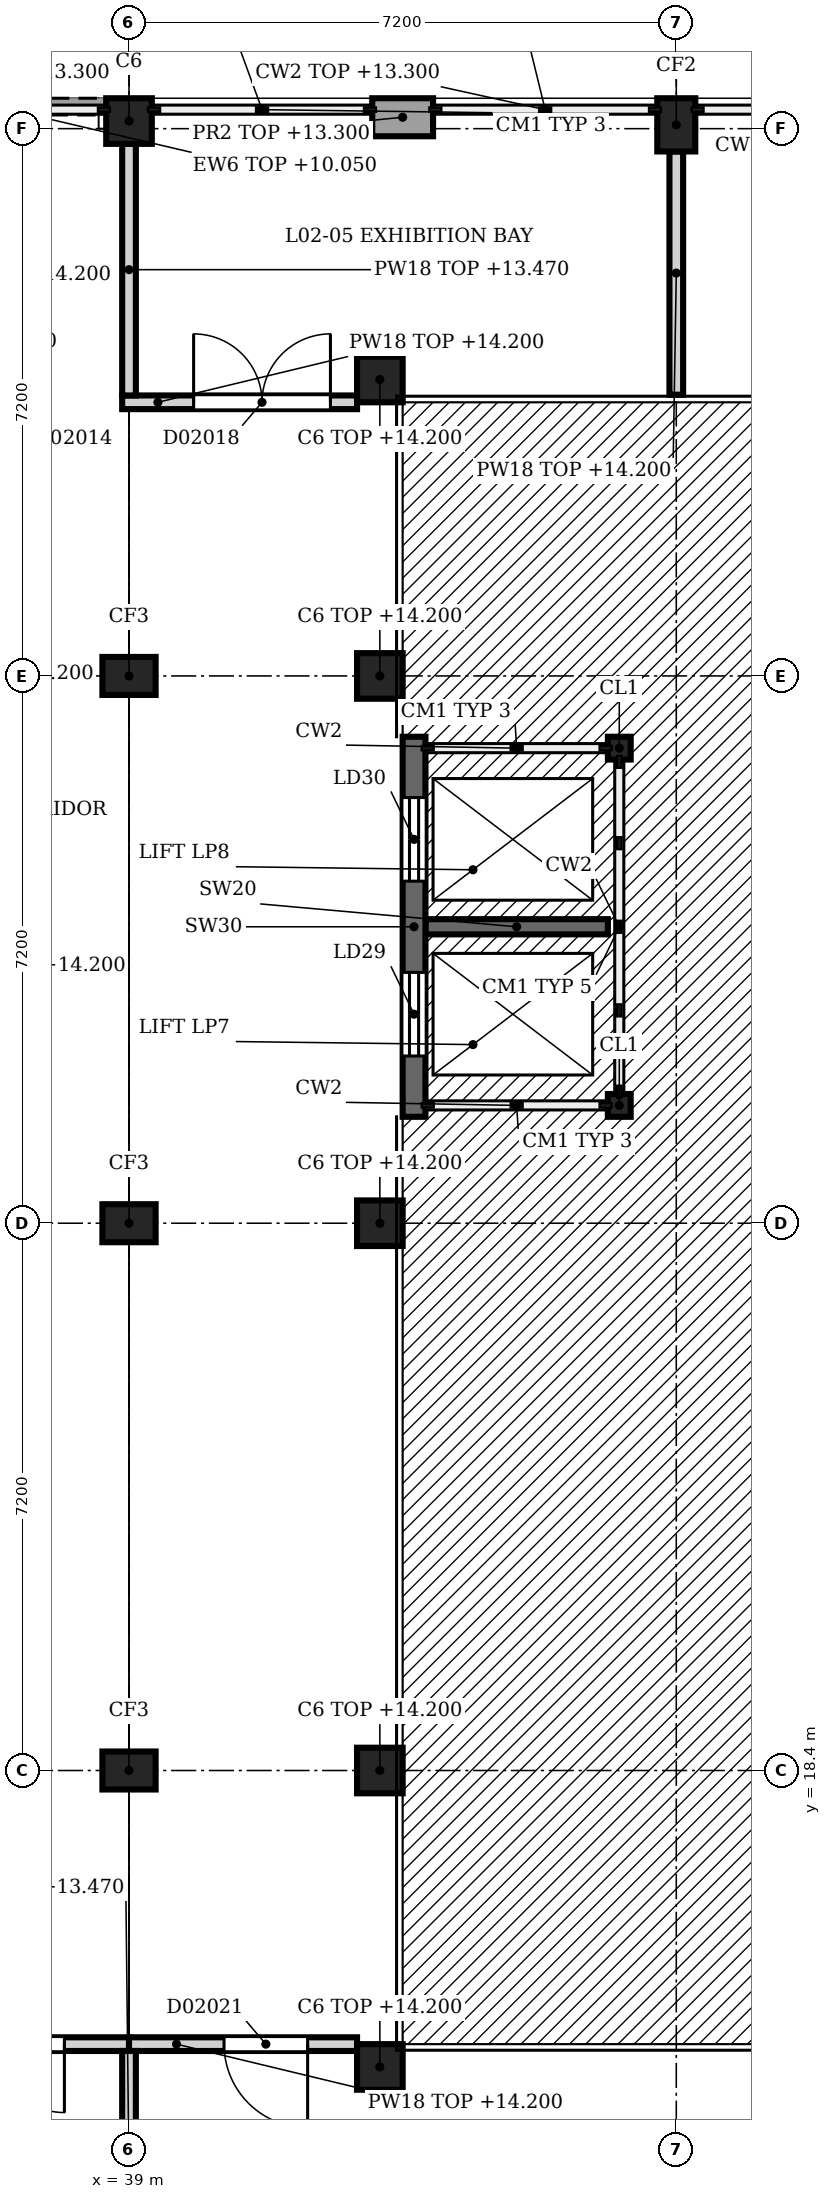
"""IFC4 building model, lengths in metres.
Left out: names, types, materials, properties, quantities, classifications, styles, units other than length and angle.
Written with IfcOpenShell. Run it as: python <this file> out.ifc"""

import sys

from ifc_helpers import new_model, si_unit, direction, frame, frame_2d, origin, origin_2d, place, context, subcontext, project, spatial, rectangle, extrude, element, fill, save


model = new_model("IFC4")
c1 = context("Model", 3, precision=1e-05, world=origin(), true_north=direction((0.0, 1.0)))
c2 = subcontext(c1, "Body", "Model", "MODEL_VIEW")
j1 = project(units=[si_unit("LENGTHUNIT", "METRE"), si_unit("PLANEANGLEUNIT", "RADIAN")], contexts=[c1])
p1 = place(None, origin())
s1 = spatial("IfcSite", under=j1, at=p1, CompositionType="ELEMENT")
p2 = place(p1, origin())
s2 = spatial("IfcBuilding", under=s1, at=p2, CompositionType="ELEMENT")
p3 = place(p2, frame((0.0, 0.0, 9.9)))
s3 = spatial("IfcBuildingStorey", under=s2, at=p3, CompositionType="ELEMENT", Elevation=9.9)
for number, where, z_axis, x_axis in (
    (1, (39.0, 18.4, 0.0), (0.0, 0.0, 1.0), (1.0, 0.0, 0.0)),
    (2, (39.0, 25.6, 0.0), (0.0, 0.0, 1.0), (1.0, 0.0, 0.0)),
    (3, (39.0, 32.8, 0.0), (0.0, 0.0, 1.0), (1.0, 0.0, 0.0)),
):
    element("IfcColumn", number, at=place(p3, frame(where, z_axis=z_axis, x_axis=x_axis)), inside=s3, PredefinedType="COLUMN", context=c2, shape_type="SweptSolid", body=[
        extrude(rectangle(XDim=0.7, YDim=0.5, at=origin_2d()), origin(), (0.0, 0.0, 1.0), 4.5),
    ])
p4 = place(p3, frame((39.0, 40.1, 0.0), z_axis=(0.0, 0.0, 1.0), x_axis=(1.0, 0.0, 0.0)))
e4 = element("IfcColumn", 4, at=p4, inside=s3, PredefinedType="COLUMN", context=c2, shape_type="SweptSolid", body=[
    extrude(rectangle(XDim=0.6, YDim=0.6, at=origin_2d()), origin(), (0.0, 0.0, 1.0), 4.5),
])
p5 = place(p3, frame((46.2, 40.05, 0.0), z_axis=(0.0, 0.0, 1.0), x_axis=(1.0, 0.0, 0.0)))
e5 = element("IfcColumn", 5, at=p5, inside=s3, PredefinedType="COLUMN", context=c2, shape_type="SweptSolid", body=[
    extrude(rectangle(XDim=0.5, YDim=0.7, at=origin_2d()), origin(), (0.0, 0.0, 1.0), 4.5),
])
for number, where, z_axis, x_axis in (
    (6, (42.3, 14.5, 0.0), (0.0, 0.0, 1.0), (1.0, 0.0, 0.0)),
    (7, (42.3, 18.4, 0.0), (0.0, 0.0, 1.0), (1.0, 0.0, 0.0)),
    (8, (42.3, 25.6, 0.0), (0.0, 0.0, 1.0), (1.0, 0.0, 0.0)),
    (9, (42.3, 32.8, 0.0), (0.0, 0.0, 1.0), (1.0, 0.0, 0.0)),
    (10, (42.3, 36.7, 0.0), (0.0, 0.0, 1.0), (1.0, 0.0, 0.0)),
):
    element("IfcColumn", number, at=place(p3, frame(where, z_axis=z_axis, x_axis=x_axis)), inside=s3, PredefinedType="COLUMN", context=c2, shape_type="SweptSolid", body=[
        extrude(rectangle(XDim=0.6, YDim=0.6, at=origin_2d()), origin(), (0.0, 0.0, 1.0), 4.3),
    ])
p6 = place(p3, frame((35.8, 40.29, 0.0), z_axis=(0.0, 0.0, 1.0), x_axis=(1.0, 0.0, 0.0)))
e11 = element("IfcWall", 11, at=p6, inside=s3, PredefinedType="SOLIDWALL", context=c2, shape_type="SweptSolid", body=[
    extrude(rectangle(XDim=2.9, YDim=0.22, at=frame_2d((1.45, 0.0))), origin(), (0.0, 0.0, 1.0), 0.15),
])
p7 = place(p3, frame((42.2, 40.15, 0.0), z_axis=(0.0, 0.0, 1.0), x_axis=(1.0, 0.0, 0.0)))
e12 = element("IfcWall", 12, at=p7, inside=s3, PredefinedType="SOLIDWALL", context=c2, shape_type="SweptSolid", body=[
    extrude(rectangle(XDim=0.8, YDim=0.5, at=frame_2d((0.4, 0.0))), origin(), (0.0, 0.0, 1.0), 3.4),
])
p8 = place(p3, frame((35.4, 14.8, 0.0), z_axis=(0.0, 0.0, 1.0), x_axis=(1.0, 0.0, 0.0)))
e13 = element("IfcWall", 13, at=p8, inside=s3, PredefinedType="PARTITIONING", context=c2, shape_type="SweptSolid", body=[
    extrude(rectangle(XDim=3.6, YDim=0.18, at=frame_2d((1.8, 0.0))), origin(), (0.0, 0.0, 1.0), 4.3),
])
p9 = place(p8, frame((0.95, 0.0, 0.0)))
e14 = element("IfcOpeningElement", 14, at=p9, cuts=e13, PredefinedType="OPENING", context=c2, shape_type="SweptSolid", body=[
    extrude(rectangle(XDim=1.8, YDim=2.1, at=frame_2d((0.9, 1.05))), frame((0.0, 0.1, 0.0), z_axis=(0.0, -1.0, 0.0), x_axis=(1.0, 0.0, 0.0)), (0.0, 0.0, 1.0), 0.2),
])
p10 = place(p3, frame((42.0, 14.8, 0.0), z_axis=(0.0, 0.0, 1.0), x_axis=(-1.0, 0.0, 0.0)))
e15 = element("IfcWall", 15, at=p10, inside=s3, PredefinedType="PARTITIONING", context=c2, shape_type="SweptSolid", body=[
    extrude(rectangle(XDim=3.0, YDim=0.18, at=frame_2d((1.5, 0.0))), origin(), (0.0, 0.0, 1.0), 4.3),
])
p11 = place(p10, frame((0.65, 0.0, 0.0)))
e16 = element("IfcOpeningElement", 16, at=p11, cuts=e15, PredefinedType="OPENING", context=c2, shape_type="SweptSolid", body=[
    extrude(rectangle(XDim=1.1, YDim=2.3, at=frame_2d((0.55, 1.15))), frame((0.0, 0.1, 0.0), z_axis=(0.0, -1.0, 0.0), x_axis=(1.0, 0.0, 0.0)), (0.0, 0.0, 1.0), 0.2),
])
p12 = place(p3, frame((42.0, 36.4, 0.0), z_axis=(0.0, 0.0, 1.0), x_axis=(-1.0, 0.0, 0.0)))
e17 = element("IfcWall", 17, at=p12, inside=s3, PredefinedType="PARTITIONING", context=c2, shape_type="SweptSolid", body=[
    extrude(rectangle(XDim=3.09, YDim=0.18, at=frame_2d((1.545, 0.0))), origin(), (0.0, 0.0, 1.0), 4.3),
])
p13 = place(p12, frame((0.35, 0.0, 0.0)))
e18 = element("IfcOpeningElement", 18, at=p13, cuts=e17, PredefinedType="OPENING", context=c2, shape_type="SweptSolid", body=[
    extrude(rectangle(XDim=1.8, YDim=2.3, at=frame_2d((0.9, 1.15))), frame((0.0, 0.1, 0.0), z_axis=(0.0, -1.0, 0.0), x_axis=(1.0, 0.0, 0.0)), (0.0, 0.0, 1.0), 0.2),
])
for number, where, z_axis, x_axis in (
    (19, (39.0, 11.4, 0.0), (0.0, 0.0, 1.0), (0.0, 1.0, 0.0)),
    (20, (39.0, 36.49, 0.0), (0.0, 0.0, 1.0), (0.0, 1.0, 0.0)),
):
    element("IfcWall", number, at=place(p3, frame(where, z_axis=z_axis, x_axis=x_axis)), inside=s3, PredefinedType="PARTITIONING", context=c2, shape_type="SweptSolid", body=[
        extrude(rectangle(XDim=3.31, YDim=0.18, at=frame_2d((1.655, 0.0))), origin(), (0.0, 0.0, 1.0), 3.57),
    ])
p14 = place(p3, frame((46.2, 36.5, 0.0), z_axis=(0.0, 0.0, 1.0), x_axis=(0.0, 1.0, 0.0)))
e21 = element("IfcWall", 21, at=p14, inside=s3, PredefinedType="PARTITIONING", context=c2, shape_type="SweptSolid", body=[
    extrude(rectangle(XDim=3.2, YDim=0.18, at=frame_2d((1.6, 0.0))), origin(), (0.0, 0.0, 1.0), 4.3),
])
p15 = place(p3, frame((42.75, 27.0, 0.0), z_axis=(0.0, 0.0, 1.0), x_axis=(0.0, 1.0, 0.0)))
e22 = element("IfcWall", 22, at=p15, inside=s3, PredefinedType="SHEAR", context=c2, shape_type="SweptSolid", body=[
    extrude(rectangle(XDim=5.0, YDim=0.3, at=frame_2d((2.5, 0.0))), origin(), (0.0, 0.0, 1.0), 4.5),
])
p16 = place(p15, frame((0.8, 0.0, 0.0)))
e23 = element("IfcOpeningElement", 23, at=p16, cuts=e22, PredefinedType="OPENING", context=c2, shape_type="SweptSolid", body=[
    extrude(rectangle(XDim=1.1, YDim=2.1, at=frame_2d((0.55, 1.05))), frame((0.0, 0.16, 0.0), z_axis=(0.0, -1.0, 0.0), x_axis=(1.0, 0.0, 0.0)), (0.0, 0.0, 1.0), 0.32),
])
p17 = place(p15, frame((3.1, 0.0, 0.0)))
e24 = element("IfcOpeningElement", 24, at=p17, cuts=e22, PredefinedType="OPENING", context=c2, shape_type="SweptSolid", body=[
    extrude(rectangle(XDim=1.1, YDim=2.1, at=frame_2d((0.55, 1.05))), frame((0.0, 0.16, 0.0), z_axis=(0.0, -1.0, 0.0), x_axis=(1.0, 0.0, 0.0)), (0.0, 0.0, 1.0), 0.32),
])
p18 = place(p3, frame((42.9, 29.5, 0.0), z_axis=(0.0, 0.0, 1.0), x_axis=(1.0, 0.0, 0.0)))
e25 = element("IfcWall", 25, at=p18, inside=s3, PredefinedType="SHEAR", context=c2, shape_type="SweptSolid", body=[
    extrude(rectangle(XDim=2.4, YDim=0.2, at=frame_2d((1.2, 0.0))), origin(), (0.0, 0.0, 1.0), 4.5),
])
for number, where, z_axis, x_axis in (
    (26, (45.45, 27.15, 0.0), (0.0, 0.0, 1.0), (1.0, 0.0, 0.0)),
    (27, (45.45, 31.85, 0.0), (0.0, 0.0, 1.0), (1.0, 0.0, 0.0)),
):
    element("IfcColumn", number, at=place(p3, frame(where, z_axis=z_axis, x_axis=x_axis)), inside=s3, PredefinedType="COLUMN", context=c2, shape_type="SweptSolid", body=[
        extrude(rectangle(XDim=0.3, YDim=0.3, at=origin_2d()), origin(), (0.0, 0.0, 1.0), 4.5),
    ])
p19 = place(p9, origin())
e28 = element("IfcDoor", 28, at=p19, inside=s3, OperationType="SINGLE_SWING_LEFT", PredefinedType="DOOR", context=c2, shape_type="SweptSolid", body=[
    extrude(rectangle(XDim=1.8, YDim=2.1, at=frame_2d((0.9, 1.05))), frame((0.0, 0.025, 0.0), z_axis=(0.0, -1.0, 0.0), x_axis=(1.0, 0.0, 0.0)), (0.0, 0.0, 1.0), 0.05),
])
fill(e14, e28)
p20 = place(p11, origin())
e29 = element("IfcDoor", 29, at=p20, inside=s3, OperationType="SINGLE_SWING_LEFT", PredefinedType="DOOR", context=c2, shape_type="SweptSolid", body=[
    extrude(rectangle(XDim=1.1, YDim=2.3, at=frame_2d((0.55, 1.15))), frame((0.0, 0.025, 0.0), z_axis=(0.0, -1.0, 0.0), x_axis=(1.0, 0.0, 0.0)), (0.0, 0.0, 1.0), 0.05),
])
fill(e16, e29)
p21 = place(p13, origin())
e30 = element("IfcDoor", 30, at=p21, inside=s3, OperationType="SINGLE_SWING_LEFT", PredefinedType="DOOR", context=c2, shape_type="SweptSolid", body=[
    extrude(rectangle(XDim=1.8, YDim=2.3, at=frame_2d((0.9, 1.15))), frame((0.0, 0.025, 0.0), z_axis=(0.0, -1.0, 0.0), x_axis=(1.0, 0.0, 0.0)), (0.0, 0.0, 1.0), 0.05),
])
fill(e18, e30)
p22 = place(p16, origin())
e31 = element("IfcDoor", 31, at=p22, inside=s3, OperationType="DOUBLE_DOOR_SLIDING", PredefinedType="DOOR", context=c2, shape_type="SweptSolid", body=[
    extrude(rectangle(XDim=1.1, YDim=2.1, at=frame_2d((0.55, 1.05))), frame((0.0, 0.025, 0.0), z_axis=(0.0, -1.0, 0.0), x_axis=(1.0, 0.0, 0.0)), (0.0, 0.0, 1.0), 0.05),
])
fill(e23, e31)
p23 = place(p17, origin())
e32 = element("IfcDoor", 32, at=p23, inside=s3, OperationType="DOUBLE_DOOR_SLIDING", PredefinedType="DOOR", context=c2, shape_type="SweptSolid", body=[
    extrude(rectangle(XDim=1.1, YDim=2.1, at=frame_2d((0.55, 1.05))), frame((0.0, 0.025, 0.0), z_axis=(0.0, -1.0, 0.0), x_axis=(1.0, 0.0, 0.0)), (0.0, 0.0, 1.0), 0.05),
])
fill(e24, e32)
save(model, sys.argv[1])
